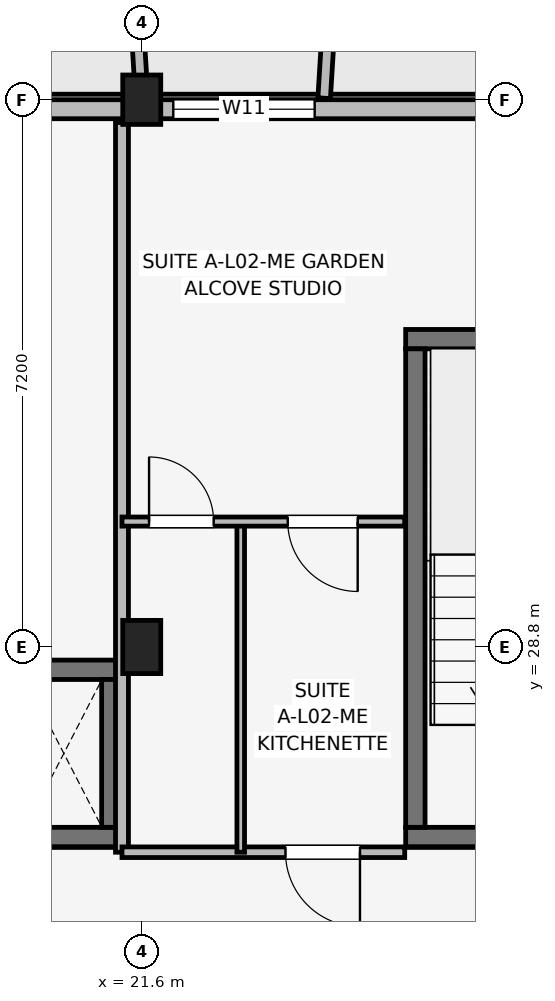
"""IFC4 building model, lengths in metres.
Left out: names, types, materials, properties, quantities, classifications, styles, units other than length and angle.
Written with IfcOpenShell. Run it as: python <this file> out.ifc"""

import sys

from ifc_helpers import new_model, si_unit, direction, frame, frame_2d, origin, origin_2d, place, context, subcontext, project, spatial, rectangle, extrude, element, fill, save


model = new_model("IFC4")
c1 = context("Model", 3, precision=1e-05, world=origin(), true_north=direction((0.0, 1.0)))
c2 = subcontext(c1, "Body", "Model", "MODEL_VIEW")
j1 = project(units=[si_unit("LENGTHUNIT", "METRE"), si_unit("PLANEANGLEUNIT", "RADIAN")], contexts=[c1])
p1 = place(None, origin())
s1 = spatial("IfcSite", under=j1, at=p1, CompositionType="ELEMENT")
p2 = place(p1, origin())
s2 = spatial("IfcBuilding", under=s1, at=p2, CompositionType="ELEMENT")
p3 = place(p2, frame((0.0, 0.0, 8.7)))
s3 = spatial("IfcBuildingStorey", under=s2, at=p3, CompositionType="ELEMENT", Elevation=8.7)
p4 = place(p3, frame((21.6, 28.8, 0.0), z_axis=(0.0, 0.0, 1.0), x_axis=(1.0, 0.0, 0.0)))
e1 = element("IfcColumn", 1, at=p4, inside=s3, PredefinedType="COLUMN", context=c2, shape_type="SweptSolid", body=[
    extrude(rectangle(XDim=0.5, YDim=0.7, at=origin_2d()), origin(), (0.0, 0.0, 1.0), 3.15),
])
p5 = place(p3, frame((21.6, 36.0, 0.0), z_axis=(0.0, 0.0, 1.0), x_axis=(1.0, 0.0, 0.0)))
e2 = element("IfcColumn", 2, at=p5, inside=s3, PredefinedType="COLUMN", context=c2, shape_type="SweptSolid", body=[
    extrude(rectangle(XDim=0.5, YDim=0.65, at=origin_2d()), origin(), (0.0, 0.0, 1.0), 3.15),
])
p6 = place(p3, frame((25.073, 26.3, 0.0), z_axis=(0.0, 0.0, 1.0), x_axis=(1.0, 0.0, 0.0)))
e3 = element("IfcWall", 3, at=p6, inside=s3, PredefinedType="SHEAR", context=c2, shape_type="SweptSolid", body=[
    extrude(rectangle(XDim=3.305, YDim=0.255, at=frame_2d((1.652, 0.0))), origin(), (0.0, 0.0, 1.0), 3.15),
])
p7 = place(p6, frame((1.127, 0.0, 0.0)))
e4 = element("IfcOpeningElement", 4, at=p7, cuts=e3, PredefinedType="OPENING", context=c2, shape_type="SweptSolid", body=[
    extrude(rectangle(XDim=1.05, YDim=2.12, at=frame_2d((0.525, 1.06))), frame((0.0, 0.137, 0.0), z_axis=(0.0, -1.0, 0.0), x_axis=(1.0, 0.0, 0.0)), (0.0, 0.0, 1.0), 0.275),
])
p8 = place(p3, frame((25.073, 32.85, 0.0), z_axis=(0.0, 0.0, 1.0), x_axis=(1.0, 0.0, 0.0)))
e5 = element("IfcWall", 5, at=p8, inside=s3, PredefinedType="SHEAR", context=c2, shape_type="SweptSolid", body=[
    extrude(rectangle(XDim=3.305, YDim=0.255, at=frame_2d((1.652, 0.0))), origin(), (0.0, 0.0, 1.0), 3.15),
])
p9 = place(p3, frame((25.2, 26.427, 0.0), z_axis=(0.0, 0.0, 1.0), x_axis=(0.0, 1.0, 0.0)))
e6 = element("IfcWall", 6, at=p9, inside=s3, PredefinedType="SHEAR", context=c2, shape_type="SweptSolid", body=[
    extrude(rectangle(XDim=6.295, YDim=0.255, at=frame_2d((3.147, 0.0))), origin(), (0.0, 0.0, 1.0), 3.15),
])
for number, where, z_axis, x_axis in (
    (7, (19.522, 26.3, 0.0), (0.0, 0.0, 1.0), (1.0, 0.0, 0.0)),
    (8, (19.522, 28.5, 0.0), (0.0, 0.0, 1.0), (1.0, 0.0, 0.0)),
):
    element("IfcWall", number, at=place(p3, frame(where, z_axis=z_axis, x_axis=x_axis)), inside=s3, PredefinedType="SHEAR", context=c2, shape_type="SweptSolid", body=[
        extrude(rectangle(XDim=1.805, YDim=0.255, at=frame_2d((0.902, 0.0))), origin(), (0.0, 0.0, 1.0), 3.15),
    ])
p10 = place(p3, frame((21.2, 26.427, 0.0), z_axis=(0.0, 0.0, 1.0), x_axis=(0.0, 1.0, 0.0)))
e9 = element("IfcWall", 9, at=p10, inside=s3, PredefinedType="SHEAR", context=c2, shape_type="SweptSolid", body=[
    extrude(rectangle(XDim=1.945, YDim=0.255, at=frame_2d((0.973, 0.0))), origin(), (0.0, 0.0, 1.0), 3.15),
])
p11 = place(p3, frame((32.6, 35.875, 0.0), z_axis=(0.0, 0.0, 1.0), x_axis=(-1.0, 0.0, 0.0)))
e10 = element("IfcWall", 10, at=p11, inside=s3, PredefinedType="SOLIDWALL", context=c2, shape_type="SweptSolid", body=[
    extrude(rectangle(XDim=29.2, YDim=0.25, at=frame_2d((14.6, 0.0))), origin(), (0.0, 0.0, 1.0), 2.43),
])
p12 = place(p11, frame((27.55, 0.0, 0.0), z_axis=(0.0, 0.0, 1.0), x_axis=(-1.0, 0.0, 0.0)))
e11 = element("IfcOpeningElement", 11, at=p12, cuts=e10, PredefinedType="OPENING", context=c2, shape_type="SweptSolid", body=[
    extrude(rectangle(XDim=1.5, YDim=2.15, at=frame_2d((0.75, 1.075))), frame((0.0, 0.135, 0.0), z_axis=(0.0, -1.0, 0.0), x_axis=(1.0, 0.0, 0.0)), (0.0, 0.0, 1.0), 0.27),
])
p13 = place(p11, frame((3.15, 0.0, 0.0), z_axis=(0.0, 0.0, 1.0), x_axis=(-1.0, 0.0, 0.0)))
e12 = element("IfcOpeningElement", 12, at=p13, cuts=e10, PredefinedType="OPENING", context=c2, shape_type="SweptSolid", body=[
    extrude(rectangle(XDim=1.5, YDim=2.15, at=frame_2d((0.75, 1.075))), frame((0.0, 0.135, 0.0), z_axis=(0.0, -1.0, 0.0), x_axis=(1.0, 0.0, 0.0)), (0.0, 0.0, 1.0), 0.27),
])
p14 = place(p11, frame((14.025, 0.0, 0.5)))
e13 = element("IfcOpeningElement", 13, at=p14, cuts=e10, PredefinedType="OPENING", context=c2, shape_type="SweptSolid", body=[
    extrude(rectangle(XDim=1.15, YDim=1.68, at=frame_2d((0.575, 0.84))), frame((0.0, 0.135, 0.0), z_axis=(0.0, -1.0, 0.0), x_axis=(1.0, 0.0, 0.0)), (0.0, 0.0, 1.0), 0.27),
])
p15 = place(p11, frame((8.725, 0.0, 0.7)))
e14 = element("IfcOpeningElement", 14, at=p15, cuts=e10, PredefinedType="OPENING", context=c2, shape_type="SweptSolid", body=[
    extrude(rectangle(XDim=1.86, YDim=1.6, at=frame_2d((0.93, 0.8))), frame((0.0, 0.135, 0.0), z_axis=(0.0, -1.0, 0.0), x_axis=(1.0, 0.0, 0.0)), (0.0, 0.0, 1.0), 0.27),
])
p16 = place(p11, frame((18.615, 0.0, 0.7)))
e15 = element("IfcOpeningElement", 15, at=p16, cuts=e10, PredefinedType="OPENING", context=c2, shape_type="SweptSolid", body=[
    extrude(rectangle(XDim=1.86, YDim=1.6, at=frame_2d((0.93, 0.8))), frame((0.0, 0.135, 0.0), z_axis=(0.0, -1.0, 0.0), x_axis=(1.0, 0.0, 0.0)), (0.0, 0.0, 1.0), 0.27),
])
p17 = place(p3, frame((21.6, 36.02, 0.0), z_axis=(0.0, 0.0, 1.0), x_axis=(-0.061170732449, 0.998127317276, 0.0)))
e16 = element("IfcWall", 16, at=p17, inside=s3, PredefinedType="ELEMENTEDWALL", context=c2, shape_type="SweptSolid", body=[
    extrude(rectangle(XDim=1.964, YDim=0.165, at=frame_2d((0.982, 0.0))), origin(), (0.0, 0.0, 1.0), 2.95),
])
p18 = place(p3, frame((24.0, 36.02, 0.0), z_axis=(0.0, 0.0, 1.0), x_axis=(0.061170732449, 0.998127317276, 0.0)))
e17 = element("IfcWall", 17, at=p18, inside=s3, PredefinedType="ELEMENTEDWALL", context=c2, shape_type="SweptSolid", body=[
    extrude(rectangle(XDim=1.964, YDim=0.165, at=frame_2d((0.982, 0.0))), origin(), (0.0, 0.0, 1.0), 2.45),
])
p19 = place(p3, frame((21.34, 26.1, 0.0), z_axis=(0.0, 0.0, 1.0), x_axis=(0.0, 1.0, 0.0)))
e18 = element("IfcWall", 18, at=p19, inside=s3, PredefinedType="PARTITIONING", context=c2, shape_type="SweptSolid", body=[
    extrude(rectangle(XDim=9.6, YDim=0.17, at=frame_2d((4.8, 0.0))), origin(), (0.0, 0.0, 1.0), 2.38),
])
p20 = place(p3, frame((21.34, 26.1, 0.0), z_axis=(0.0, 0.0, 1.0), x_axis=(1.0, 0.0, 0.0)))
e19 = element("IfcWall", 19, at=p20, inside=s3, PredefinedType="PARTITIONING", context=c2, shape_type="SweptSolid", body=[
    extrude(rectangle(XDim=3.72, YDim=0.14, at=frame_2d((1.86, 0.0))), origin(), (0.0, 0.0, 1.0), 2.38),
])
p21 = place(p20, frame((3.131, 0.0, 0.0), z_axis=(0.0, 0.0, 1.0), x_axis=(-1.0, 0.0, 0.0)))
e20 = element("IfcOpeningElement", 20, at=p21, cuts=e19, PredefinedType="OPENING", context=c2, shape_type="SweptSolid", body=[
    extrude(rectangle(XDim=0.98, YDim=2.1, at=frame_2d((0.49, 1.05))), frame((0.0, 0.08, 0.0), z_axis=(0.0, -1.0, 0.0), x_axis=(1.0, 0.0, 0.0)), (0.0, 0.0, 1.0), 0.16),
])
p22 = place(p3, frame((22.902, 26.1, 0.0), z_axis=(0.0, 0.0, 1.0), x_axis=(0.0, 1.0, 0.0)))
e21 = element("IfcWall", 21, at=p22, inside=s3, PredefinedType="PARTITIONING", context=c2, shape_type="SweptSolid", body=[
    extrude(rectangle(XDim=4.35, YDim=0.1, at=frame_2d((2.175, 0.0))), origin(), (0.0, 0.0, 1.0), 2.375),
])
p23 = place(p3, frame((21.34, 30.45, 0.0), z_axis=(0.0, 0.0, 1.0), x_axis=(1.0, 0.0, 0.0)))
e22 = element("IfcWall", 22, at=p23, inside=s3, PredefinedType="PARTITIONING", context=c2, shape_type="SweptSolid", body=[
    extrude(rectangle(XDim=3.72, YDim=0.12, at=frame_2d((1.86, 0.0))), origin(), (0.0, 0.0, 1.0), 2.38),
])
p24 = place(p23, frame((0.356, 0.0, 0.0)))
e23 = element("IfcOpeningElement", 23, at=p24, cuts=e22, PredefinedType="OPENING", context=c2, shape_type="SweptSolid", body=[
    extrude(rectangle(XDim=0.85, YDim=2.08, at=frame_2d((0.425, 1.04))), frame((0.0, 0.07, 0.0), z_axis=(0.0, -1.0, 0.0), x_axis=(1.0, 0.0, 0.0)), (0.0, 0.0, 1.0), 0.14),
])
p25 = place(p23, frame((3.101, 0.0, 0.0), z_axis=(0.0, 0.0, 1.0), x_axis=(-1.0, 0.0, 0.0)))
e24 = element("IfcOpeningElement", 24, at=p25, cuts=e22, PredefinedType="OPENING", context=c2, shape_type="SweptSolid", body=[
    extrude(rectangle(XDim=0.92, YDim=2.08, at=frame_2d((0.46, 1.04))), frame((0.0, 0.07, 0.0), z_axis=(0.0, -1.0, 0.0), x_axis=(1.0, 0.0, 0.0)), (0.0, 0.0, 1.0), 0.14),
])
p26 = place(p15, origin())
e25 = element("IfcWindow", 25, at=p26, inside=s3, PartitioningType="SINGLE_PANEL", PredefinedType="WINDOW", context=c2, shape_type="SweptSolid", body=[
    extrude(rectangle(XDim=1.86, YDim=1.6, at=frame_2d((0.93, 0.8))), frame((0.0, 0.03, 0.0), z_axis=(0.0, -1.0, 0.0), x_axis=(1.0, 0.0, 0.0)), (0.0, 0.0, 1.0), 0.06),
])
fill(e14, e25)
p27 = place(p21, origin())
e26 = element("IfcDoor", 26, at=p27, inside=s3, OperationType="SINGLE_SWING_RIGHT", PredefinedType="DOOR", context=c2, shape_type="SweptSolid", body=[
    extrude(rectangle(XDim=0.98, YDim=2.1, at=frame_2d((0.49, 1.05))), frame((0.0, 0.025, 0.0), z_axis=(0.0, -1.0, 0.0), x_axis=(1.0, 0.0, 0.0)), (0.0, 0.0, 1.0), 0.05),
])
fill(e20, e26)
p28 = place(p24, origin())
e27 = element("IfcDoor", 27, at=p28, inside=s3, OperationType="SINGLE_SWING_LEFT", PredefinedType="DOOR", context=c2, shape_type="SweptSolid", body=[
    extrude(rectangle(XDim=0.85, YDim=2.08, at=frame_2d((0.425, 1.04))), frame((0.0, 0.025, 0.0), z_axis=(0.0, -1.0, 0.0), x_axis=(1.0, 0.0, 0.0)), (0.0, 0.0, 1.0), 0.05),
])
fill(e23, e27)
p29 = place(p25, origin())
e28 = element("IfcDoor", 28, at=p29, inside=s3, OperationType="SINGLE_SWING_RIGHT", PredefinedType="DOOR", context=c2, shape_type="SweptSolid", body=[
    extrude(rectangle(XDim=0.92, YDim=2.08, at=frame_2d((0.46, 1.04))), frame((0.0, 0.025, 0.0), z_axis=(0.0, -1.0, 0.0), x_axis=(1.0, 0.0, 0.0)), (0.0, 0.0, 1.0), 0.05),
])
fill(e24, e28)
save(model, sys.argv[1])
